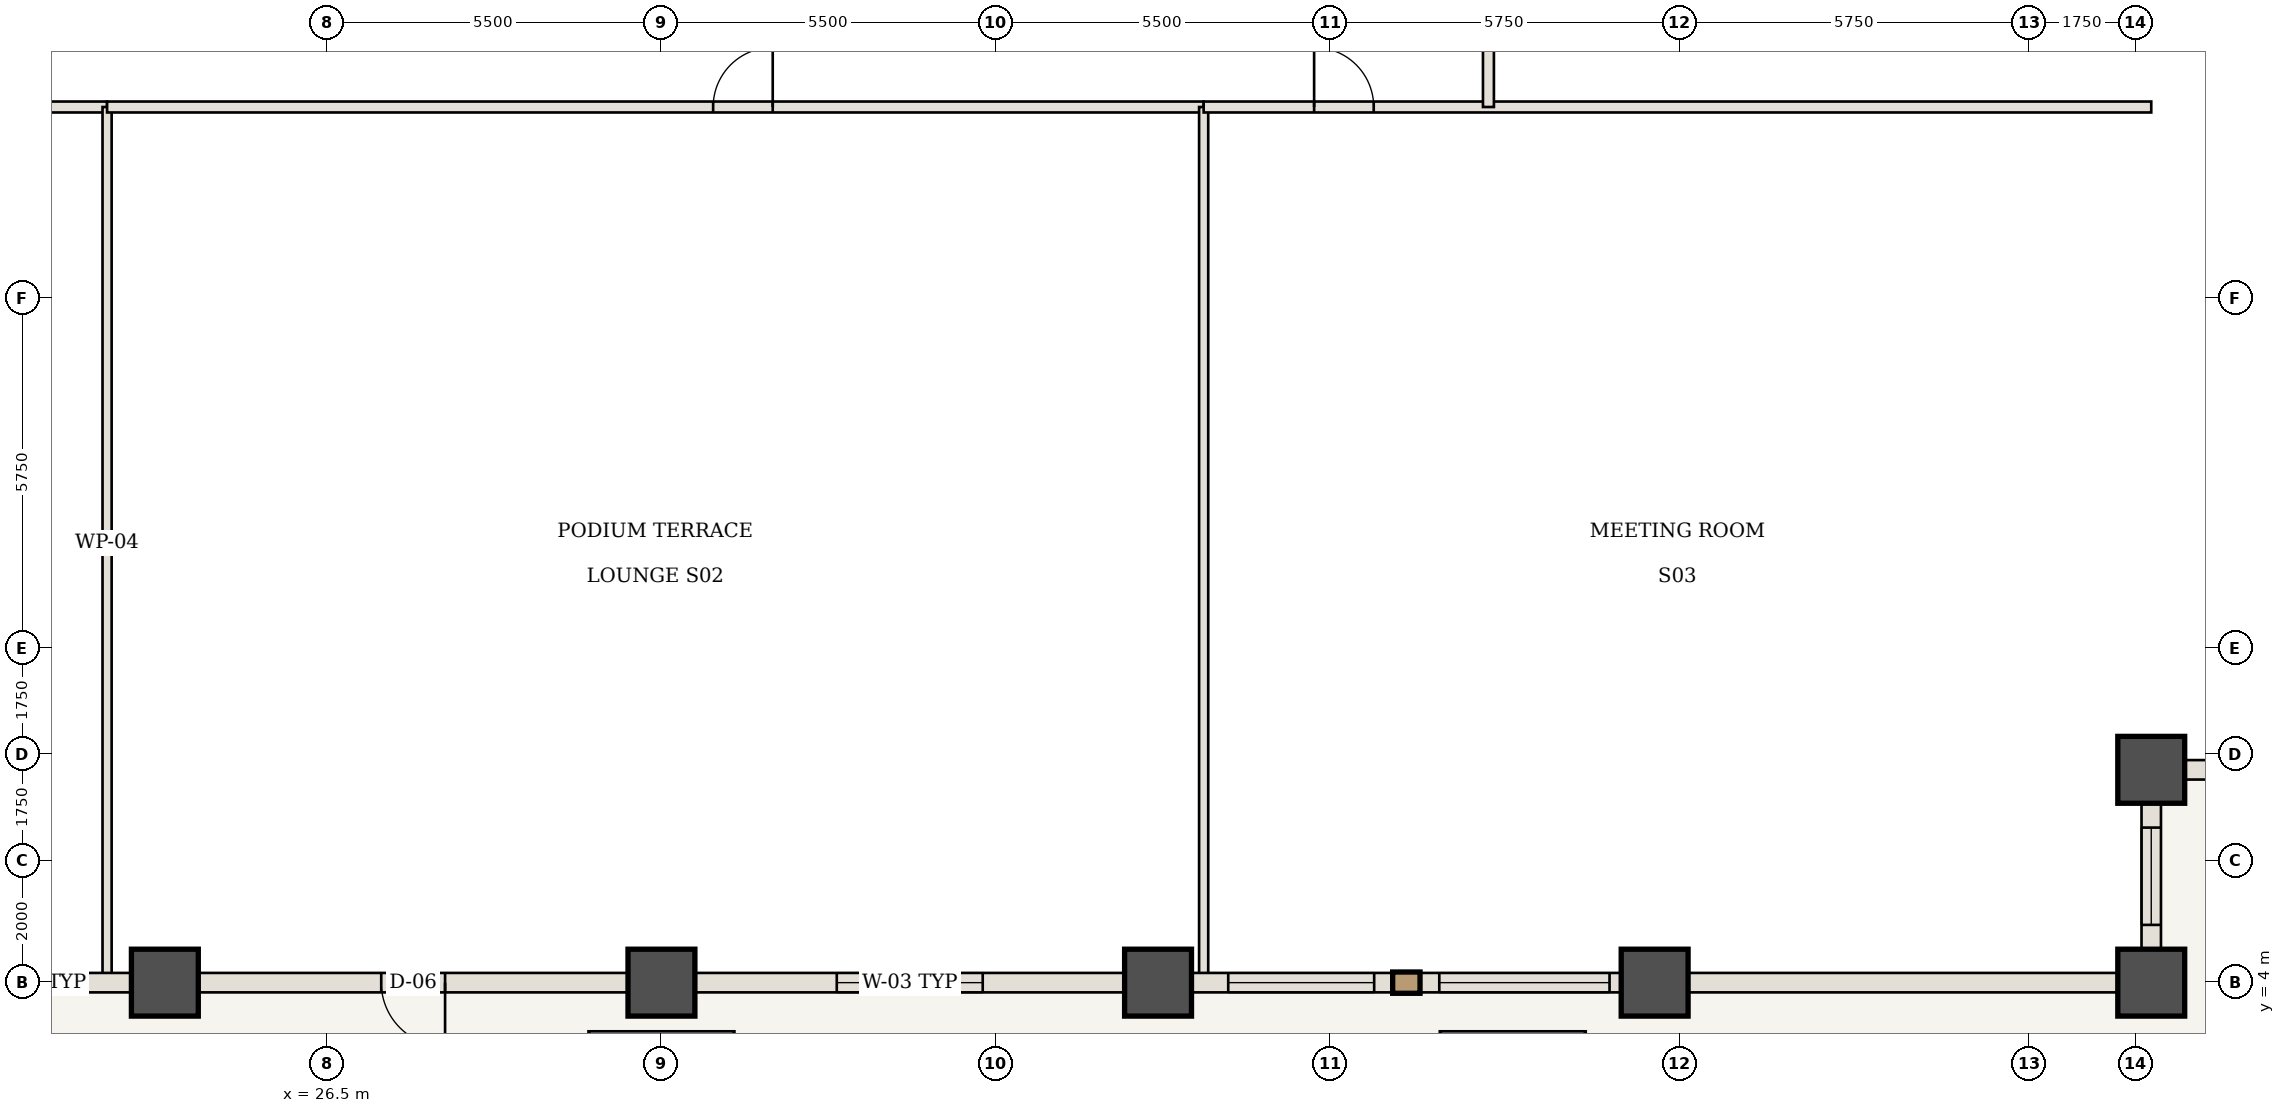
"""IFC4 building model, lengths in metres.
Left out: names, types, materials, properties, quantities, classifications, styles, units other than length and angle.
Written with IfcOpenShell. Run it as: python <this file> out.ifc"""

import sys

from ifc_helpers import new_model, si_unit, direction, frame, frame_2d, origin, origin_2d, place, context, subcontext, project, spatial, rectangle, extrude, element, fill, save


model = new_model("IFC4")
c1 = context("Model", 3, precision=1e-05, world=origin(), true_north=direction((0.0, 1.0)))
c2 = subcontext(c1, "Body", "Model", "MODEL_VIEW")
j1 = project(units=[si_unit("LENGTHUNIT", "METRE"), si_unit("PLANEANGLEUNIT", "RADIAN")], contexts=[c1])
p1 = place(None, origin())
s1 = spatial("IfcSite", under=j1, at=p1, CompositionType="ELEMENT")
p2 = place(p1, origin())
s2 = spatial("IfcBuilding", under=s1, at=p2, CompositionType="ELEMENT")
p3 = place(p2, frame((0.0, 0.0, 34.3)))
s3 = spatial("IfcBuildingStorey", under=s2, at=p3, CompositionType="ELEMENT", Elevation=34.3)
for number, where, z_axis, x_axis in (
    (1, (56.5, 4.0, -0.42), (0.0, 0.0, 1.0), (1.0, 0.0, 0.0)),
    (2, (56.5, 7.5, -0.42), (0.0, 0.0, 1.0), (1.0, 0.0, 0.0)),
    (3, (23.833, 4.0, -0.42), (0.0, 0.0, 1.0), (1.0, 0.0, 0.0)),
    (4, (32.0, 4.0, -0.42), (0.0, 0.0, 1.0), (1.0, 0.0, 0.0)),
    (5, (40.167, 4.0, -0.42), (0.0, 0.0, 1.0), (1.0, 0.0, 0.0)),
    (6, (48.333, 4.0, -0.42), (0.0, 0.0, 1.0), (1.0, 0.0, 0.0)),
):
    element("IfcColumn", number, at=place(p3, frame(where, z_axis=z_axis, x_axis=x_axis)), inside=s3, PredefinedType="COLUMN", context=c2, shape_type="SweptSolid", body=[
        extrude(rectangle(XDim=1.1, YDim=1.1, at=origin_2d()), origin(), (0.0, 0.0, 1.0), 4.97),
    ])
p4 = place(p3, frame((7.5, 18.4, 0.0), z_axis=(0.0, 0.0, 1.0), x_axis=(1.0, 0.0, 0.0)))
e7 = element("IfcWall", 7, at=p4, inside=s3, PredefinedType="STANDARD", context=c2, shape_type="SweptSolid", body=[
    extrude(rectangle(XDim=15.383, YDim=0.18, at=frame_2d((7.692, 0.0))), origin(), (0.0, 0.0, 1.0), 4.13),
])
p5 = place(p4, frame((12.667, 0.0, 0.0)))
e8 = element("IfcOpeningElement", 8, at=p5, cuts=e7, PredefinedType="OPENING", context=c2, shape_type="SweptSolid", body=[
    extrude(rectangle(XDim=0.98, YDim=2.2, at=frame_2d((0.49, 1.1))), frame((0.0, 0.1, 0.0), z_axis=(0.0, -1.0, 0.0), x_axis=(1.0, 0.0, 0.0)), (0.0, 0.0, 1.0), 0.2),
])
p6 = place(p3, frame((22.883, 4.06, 0.0), z_axis=(0.0, 0.0, 1.0), x_axis=(0.0, 1.0, 0.0)))
e9 = element("IfcWall", 9, at=p6, inside=s3, PredefinedType="STANDARD", context=c2, shape_type="SweptSolid", body=[
    extrude(rectangle(XDim=14.34, YDim=0.15, at=frame_2d((7.17, 0.0))), origin(), (0.0, 0.0, 1.0), 4.13),
])
p7 = place(p3, frame((22.883, 18.4, 0.0), z_axis=(0.0, 0.0, 1.0), x_axis=(1.0, 0.0, 0.0)))
e10 = element("IfcWall", 10, at=p7, inside=s3, PredefinedType="STANDARD", context=c2, shape_type="SweptSolid", body=[
    extrude(rectangle(XDim=18.033, YDim=0.18, at=frame_2d((9.017, 0.0))), origin(), (0.0, 0.0, 1.0), 4.13),
])
p8 = place(p7, frame((9.967, 0.0, 0.0)))
e11 = element("IfcOpeningElement", 11, at=p8, cuts=e10, PredefinedType="OPENING", context=c2, shape_type="SweptSolid", body=[
    extrude(rectangle(XDim=0.98, YDim=2.2, at=frame_2d((0.49, 1.1))), frame((0.0, 0.1, 0.0), z_axis=(0.0, -1.0, 0.0), x_axis=(1.0, 0.0, 0.0)), (0.0, 0.0, 1.0), 0.2),
])
p9 = place(p3, frame((40.917, 4.06, 0.0), z_axis=(0.0, 0.0, 1.0), x_axis=(0.0, 1.0, 0.0)))
e12 = element("IfcWall", 12, at=p9, inside=s3, PredefinedType="STANDARD", context=c2, shape_type="SweptSolid", body=[
    extrude(rectangle(XDim=14.34, YDim=0.15, at=frame_2d((7.17, 0.0))), origin(), (0.0, 0.0, 1.0), 4.13),
])
p10 = place(p3, frame((40.917, 18.4, 0.0), z_axis=(0.0, 0.0, 1.0), x_axis=(1.0, 0.0, 0.0)))
e13 = element("IfcWall", 13, at=p10, inside=s3, PredefinedType="STANDARD", context=c2, shape_type="SweptSolid", body=[
    extrude(rectangle(XDim=15.583, YDim=0.18, at=frame_2d((7.792, 0.0))), origin(), (0.0, 0.0, 1.0), 4.13),
])
p11 = place(p10, frame((1.817, 0.0, 0.0)))
e14 = element("IfcOpeningElement", 14, at=p11, cuts=e13, PredefinedType="OPENING", context=c2, shape_type="SweptSolid", body=[
    extrude(rectangle(XDim=0.98, YDim=2.2, at=frame_2d((0.49, 1.1))), frame((0.0, 0.1, 0.0), z_axis=(0.0, -1.0, 0.0), x_axis=(1.0, 0.0, 0.0)), (0.0, 0.0, 1.0), 0.2),
])
p12 = place(p3, frame((45.6, 18.4, 0.0), z_axis=(0.0, 0.0, 1.0), x_axis=(0.0, 1.0, 0.0)))
e15 = element("IfcWall", 15, at=p12, inside=s3, PredefinedType="STANDARD", context=c2, shape_type="SweptSolid", body=[
    extrude(rectangle(XDim=12.65, YDim=0.18, at=frame_2d((6.325, 0.0))), origin(), (0.0, 0.0, 1.0), 4.13),
])
p13 = place(p12, frame((5.825, 0.0, 0.0)))
e16 = element("IfcOpeningElement", 16, at=p13, cuts=e15, PredefinedType="OPENING", context=c2, shape_type="SweptSolid", body=[
    extrude(rectangle(XDim=0.98, YDim=2.2, at=frame_2d((0.49, 1.1))), frame((0.0, 0.1, 0.0), z_axis=(0.0, -1.0, 0.0), x_axis=(1.0, 0.0, 0.0)), (0.0, 0.0, 1.0), 0.2),
])
p14 = place(p3, frame((23.833, 4.0, 0.0), z_axis=(0.0, 0.0, 1.0), x_axis=(-1.0, 0.0, 0.0)))
e17 = element("IfcWall", 17, at=p14, inside=s3, PredefinedType="USERDEFINED", context=c2, shape_type="SweptSolid", body=[
    extrude(rectangle(XDim=8.167, YDim=0.32, at=frame_2d((4.083, 0.0))), origin(), (0.0, 0.0, 1.0), 3.33),
])
p15 = place(p14, frame((1.654, 0.0, 0.85)))
e18 = element("IfcOpeningElement", 18, at=p15, cuts=e17, PredefinedType="OPENING", context=c2, shape_type="SweptSolid", body=[
    extrude(rectangle(XDim=1.6, YDim=2.15, at=frame_2d((0.8, 1.075))), frame((0.0, 0.17, 0.0), z_axis=(0.0, -1.0, 0.0), x_axis=(1.0, 0.0, 0.0)), (0.0, 0.0, 1.0), 0.34),
])
p16 = place(p14, frame((4.625, 0.0, 0.85)))
e19 = element("IfcOpeningElement", 19, at=p16, cuts=e17, PredefinedType="OPENING", context=c2, shape_type="SweptSolid", body=[
    extrude(rectangle(XDim=2.8, YDim=2.05, at=frame_2d((1.4, 1.025))), frame((0.0, 0.17, 0.0), z_axis=(0.0, -1.0, 0.0), x_axis=(1.0, 0.0, 0.0)), (0.0, 0.0, 1.0), 0.34),
])
p17 = place(p3, frame((32.0, 4.0, 0.0), z_axis=(0.0, 0.0, 1.0), x_axis=(-1.0, 0.0, 0.0)))
e20 = element("IfcWall", 20, at=p17, inside=s3, PredefinedType="USERDEFINED", context=c2, shape_type="SweptSolid", body=[
    extrude(rectangle(XDim=8.167, YDim=0.32, at=frame_2d((4.083, 0.0))), origin(), (0.0, 0.0, 1.0), 3.33),
])
p18 = place(p17, frame((3.558, 0.0, 0.0)))
e21 = element("IfcOpeningElement", 21, at=p18, cuts=e20, PredefinedType="OPENING", context=c2, shape_type="SweptSolid", body=[
    extrude(rectangle(XDim=1.05, YDim=2.2, at=frame_2d((0.525, 1.1))), frame((0.0, 0.17, 0.0), z_axis=(0.0, -1.0, 0.0), x_axis=(1.0, 0.0, 0.0)), (0.0, 0.0, 1.0), 0.34),
])
p19 = place(p3, frame((40.167, 4.0, 0.0), z_axis=(0.0, 0.0, 1.0), x_axis=(-1.0, 0.0, 0.0)))
e22 = element("IfcWall", 22, at=p19, inside=s3, PredefinedType="USERDEFINED", context=c2, shape_type="SweptSolid", body=[
    extrude(rectangle(XDim=8.167, YDim=0.32, at=frame_2d((4.083, 0.0))), origin(), (0.0, 0.0, 1.0), 3.33),
])
p20 = place(p19, frame((2.883, 0.0, 0.85)))
e23 = element("IfcOpeningElement", 23, at=p20, cuts=e22, PredefinedType="OPENING", context=c2, shape_type="SweptSolid", body=[
    extrude(rectangle(XDim=2.4, YDim=1.95, at=frame_2d((1.2, 0.975))), frame((0.0, 0.17, 0.0), z_axis=(0.0, -1.0, 0.0), x_axis=(1.0, 0.0, 0.0)), (0.0, 0.0, 1.0), 0.34),
])
p21 = place(p3, frame((48.333, 4.0, 0.0), z_axis=(0.0, 0.0, 1.0), x_axis=(-1.0, 0.0, 0.0)))
e24 = element("IfcWall", 24, at=p21, inside=s3, PredefinedType="USERDEFINED", context=c2, shape_type="SweptSolid", body=[
    extrude(rectangle(XDim=8.167, YDim=0.32, at=frame_2d((4.083, 0.0))), origin(), (0.0, 0.0, 1.0), 3.33),
])
p22 = place(p21, frame((0.742, 0.0, 0.85)))
e25 = element("IfcOpeningElement", 25, at=p22, cuts=e24, PredefinedType="OPENING", context=c2, shape_type="SweptSolid", body=[
    extrude(rectangle(XDim=2.8, YDim=2.05, at=frame_2d((1.4, 1.025))), frame((0.0, 0.17, 0.0), z_axis=(0.0, -1.0, 0.0), x_axis=(1.0, 0.0, 0.0)), (0.0, 0.0, 1.0), 0.34),
])
p23 = place(p21, frame((4.613, 0.0, 0.85)))
e26 = element("IfcOpeningElement", 26, at=p23, cuts=e24, PredefinedType="OPENING", context=c2, shape_type="SweptSolid", body=[
    extrude(rectangle(XDim=2.4, YDim=1.95, at=frame_2d((1.2, 0.975))), frame((0.0, 0.17, 0.0), z_axis=(0.0, -1.0, 0.0), x_axis=(1.0, 0.0, 0.0)), (0.0, 0.0, 1.0), 0.34),
])
p24 = place(p3, frame((56.5, 4.0, 0.0), z_axis=(0.0, 0.0, 1.0), x_axis=(-1.0, 0.0, 0.0)))
e27 = element("IfcWall", 27, at=p24, inside=s3, PredefinedType="USERDEFINED", context=c2, shape_type="SweptSolid", body=[
    extrude(rectangle(XDim=8.167, YDim=0.32, at=frame_2d((4.083, 0.0))), origin(), (0.0, 0.0, 1.0), 3.33),
])
p25 = place(p3, frame((56.5, 7.5, 0.0), z_axis=(0.0, 0.0, 1.0), x_axis=(0.0, -1.0, 0.0)))
e28 = element("IfcWall", 28, at=p25, inside=s3, PredefinedType="USERDEFINED", context=c2, shape_type="SweptSolid", body=[
    extrude(rectangle(XDim=3.5, YDim=0.32, at=frame_2d((1.75, 0.0))), origin(), (0.0, 0.0, 1.0), 3.33),
])
p26 = place(p25, frame((0.95, 0.0, 0.85)))
e29 = element("IfcOpeningElement", 29, at=p26, cuts=e28, PredefinedType="OPENING", context=c2, shape_type="SweptSolid", body=[
    extrude(rectangle(XDim=1.6, YDim=2.05, at=frame_2d((0.8, 1.025))), frame((0.0, 0.17, 0.0), z_axis=(0.0, -1.0, 0.0), x_axis=(1.0, 0.0, 0.0)), (0.0, 0.0, 1.0), 0.34),
])
p27 = place(p3, frame((60.0, 7.5, 0.0), z_axis=(0.0, 0.0, 1.0), x_axis=(-1.0, 0.0, 0.0)))
e30 = element("IfcWall", 30, at=p27, inside=s3, PredefinedType="USERDEFINED", context=c2, shape_type="SweptSolid", body=[
    extrude(rectangle(XDim=3.5, YDim=0.32, at=frame_2d((1.75, 0.0))), origin(), (0.0, 0.0, 1.0), 3.33),
])
p28 = place(p27, frame((0.95, 0.0, 0.85)))
e31 = element("IfcOpeningElement", 31, at=p28, cuts=e30, PredefinedType="OPENING", context=c2, shape_type="SweptSolid", body=[
    extrude(rectangle(XDim=1.6, YDim=2.05, at=frame_2d((0.8, 1.025))), frame((0.0, 0.17, 0.0), z_axis=(0.0, -1.0, 0.0), x_axis=(1.0, 0.0, 0.0)), (0.0, 0.0, 1.0), 0.34),
])
p29 = place(p8, origin())
e32 = element("IfcDoor", 32, at=p29, inside=s3, OperationType="SINGLE_SWING_RIGHT", PredefinedType="DOOR", context=c2, shape_type="SweptSolid", body=[
    extrude(rectangle(XDim=0.98, YDim=2.2, at=frame_2d((0.49, 1.1))), frame((0.0, 0.025, 0.0), z_axis=(0.0, -1.0, 0.0), x_axis=(1.0, 0.0, 0.0)), (0.0, 0.0, 1.0), 0.05),
])
fill(e11, e32)
p30 = place(p11, origin())
e33 = element("IfcDoor", 33, at=p30, inside=s3, OperationType="SINGLE_SWING_LEFT", PredefinedType="DOOR", context=c2, shape_type="SweptSolid", body=[
    extrude(rectangle(XDim=0.98, YDim=2.2, at=frame_2d((0.49, 1.1))), frame((0.0, 0.025, 0.0), z_axis=(0.0, -1.0, 0.0), x_axis=(1.0, 0.0, 0.0)), (0.0, 0.0, 1.0), 0.05),
])
fill(e14, e33)
p31 = place(p3, frame((0.0, 0.0, -0.25)))
p32 = place(p31, frame((32.0, 2.0, 0.0)))
p33 = place(p32, frame((0.0, 0.0, 0.2)))
e34 = element("IfcWindow", 34, at=p33, inside=s3, PartitioningType="SINGLE_PANEL", PredefinedType="SKYLIGHT", context=c2, shape_type="SweptSolid", body=[
    extrude(rectangle(XDim=2.4, YDim=2.4, at=origin_2d()), origin(), (0.0, 0.0, 1.0), 0.05),
])
p34 = place(p31, frame((46.0, 2.0, 0.0)))
p35 = place(p34, frame((0.0, 0.0, 0.2)))
e35 = element("IfcWindow", 35, at=p35, inside=s3, PartitioningType="SINGLE_PANEL", PredefinedType="SKYLIGHT", context=c2, shape_type="SweptSolid", body=[
    extrude(rectangle(XDim=2.4, YDim=2.4, at=origin_2d()), origin(), (0.0, 0.0, 1.0), 0.05),
])
p36 = place(p15, origin())
e36 = element("IfcWindow", 36, at=p36, inside=s3, PartitioningType="SINGLE_PANEL", PredefinedType="WINDOW", context=c2, shape_type="SweptSolid", body=[
    extrude(rectangle(XDim=1.6, YDim=2.15, at=frame_2d((0.8, 1.075))), frame((0.0, 0.03, 0.0), z_axis=(0.0, -1.0, 0.0), x_axis=(1.0, 0.0, 0.0)), (0.0, 0.0, 1.0), 0.06),
])
fill(e18, e36)
p37 = place(p18, origin())
e37 = element("IfcDoor", 37, at=p37, inside=s3, OperationType="SINGLE_SWING_LEFT", PredefinedType="DOOR", context=c2, shape_type="SweptSolid", body=[
    extrude(rectangle(XDim=1.05, YDim=2.2, at=frame_2d((0.525, 1.1))), frame((0.0, 0.025, 0.0), z_axis=(0.0, -1.0, 0.0), x_axis=(1.0, 0.0, 0.0)), (0.0, 0.0, 1.0), 0.05),
])
fill(e21, e37)
p38 = place(p20, origin())
e38 = element("IfcWindow", 38, at=p38, inside=s3, PartitioningType="SINGLE_PANEL", PredefinedType="WINDOW", context=c2, shape_type="SweptSolid", body=[
    extrude(rectangle(XDim=2.4, YDim=1.95, at=frame_2d((1.2, 0.975))), frame((0.0, 0.03, 0.0), z_axis=(0.0, -1.0, 0.0), x_axis=(1.0, 0.0, 0.0)), (0.0, 0.0, 1.0), 0.06),
])
fill(e23, e38)
p39 = place(p22, origin())
e39 = element("IfcWindow", 39, at=p39, inside=s3, PartitioningType="SINGLE_PANEL", PredefinedType="WINDOW", context=c2, shape_type="SweptSolid", body=[
    extrude(rectangle(XDim=2.8, YDim=2.05, at=frame_2d((1.4, 1.025))), frame((0.0, 0.03, 0.0), z_axis=(0.0, -1.0, 0.0), x_axis=(1.0, 0.0, 0.0)), (0.0, 0.0, 1.0), 0.06),
])
fill(e25, e39)
p40 = place(p23, origin())
e40 = element("IfcWindow", 40, at=p40, inside=s3, PartitioningType="SINGLE_PANEL", PredefinedType="WINDOW", context=c2, shape_type="SweptSolid", body=[
    extrude(rectangle(XDim=2.4, YDim=1.95, at=frame_2d((1.2, 0.975))), frame((0.0, 0.03, 0.0), z_axis=(0.0, -1.0, 0.0), x_axis=(1.0, 0.0, 0.0)), (0.0, 0.0, 1.0), 0.06),
])
fill(e26, e40)
p41 = place(p26, origin())
e41 = element("IfcWindow", 41, at=p41, inside=s3, PartitioningType="SINGLE_PANEL", PredefinedType="WINDOW", context=c2, shape_type="SweptSolid", body=[
    extrude(rectangle(XDim=1.6, YDim=2.05, at=frame_2d((0.8, 1.025))), frame((0.0, 0.03, 0.0), z_axis=(0.0, -1.0, 0.0), x_axis=(1.0, 0.0, 0.0)), (0.0, 0.0, 1.0), 0.06),
])
fill(e29, e41)
save(model, sys.argv[1])
